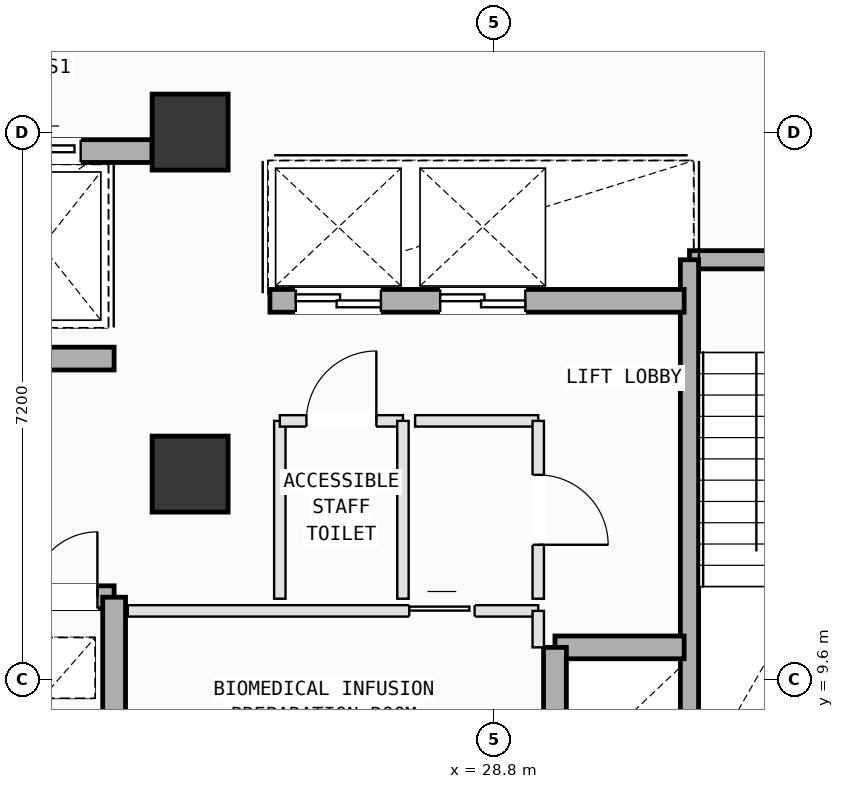
"""IFC4 building model, lengths in metres.
Left out: names, types, materials, properties, quantities, classifications, styles, units other than length and angle.
Written with IfcOpenShell. Run it as: python <this file> out.ifc"""

import sys

from ifc_helpers import new_model, si_unit, direction, frame, frame_2d, origin, origin_2d, place, context, subcontext, project, spatial, rectangle, extrude, element, fill, save


model = new_model("IFC4")
c1 = context("Model", 3, precision=1e-05, world=origin(), true_north=direction((0.0, 1.0)))
c2 = subcontext(c1, "Body", "Model", "MODEL_VIEW")
j1 = project(units=[si_unit("LENGTHUNIT", "METRE"), si_unit("PLANEANGLEUNIT", "RADIAN")], contexts=[c1])
p1 = place(None, origin())
s1 = spatial("IfcSite", under=j1, at=p1, CompositionType="ELEMENT")
p2 = place(p1, origin())
s2 = spatial("IfcBuilding", under=s1, at=p2, CompositionType="ELEMENT")
p3 = place(p2, frame((0.0, 0.0, 223.2)))
s3 = spatial("IfcBuildingStorey", under=s2, at=p3, CompositionType="ELEMENT", Elevation=223.2)
for number, where, z_axis, x_axis in (
    (1, (24.8, 12.3, 0.0), (0.0, 0.0, 1.0), (1.0, 0.0, 0.0)),
    (2, (24.8, 16.8, 0.0), (0.0, 0.0, 1.0), (1.0, 0.0, 0.0)),
):
    element("IfcColumn", number, at=place(p3, frame(where, z_axis=z_axis, x_axis=x_axis)), inside=s3, PredefinedType="COLUMN", context=c2, shape_type="SweptSolid", body=[
        extrude(rectangle(XDim=1.0, YDim=1.0, at=origin_2d()), origin(), (0.0, 0.0, 1.0), 4.0),
    ])
p4 = place(p3, frame((31.37, 15.12, 0.0), z_axis=(0.0, 0.0, 1.0), x_axis=(1.0, 0.0, 0.0)))
e3 = element("IfcWall", 3, at=p4, inside=s3, PredefinedType="SOLIDWALL", context=c2, shape_type="SweptSolid", body=[
    extrude(rectangle(XDim=3.46, YDim=0.24, at=frame_2d((1.73, 0.0))), origin(), (0.0, 0.0, 1.0), 3.78),
])
p5 = place(p4, frame((2.14, 0.0, 0.0)))
e4 = element("IfcOpeningElement", 4, at=p5, cuts=e3, PredefinedType="OPENING", context=c2, shape_type="SweptSolid", body=[
    extrude(rectangle(XDim=1.1, YDim=2.15, at=frame_2d((0.55, 1.075))), frame((0.0, 0.13, 0.0), z_axis=(0.0, -1.0, 0.0), x_axis=(1.0, 0.0, 0.0)), (0.0, 0.0, 1.0), 0.26),
])
p6 = place(p3, frame((31.37, 8.075, 0.0), z_axis=(0.0, 0.0, 1.0), x_axis=(0.0, 1.0, 0.0)))
e5 = element("IfcWall", 5, at=p6, inside=s3, PredefinedType="SOLIDWALL", context=c2, shape_type="SweptSolid", body=[
    extrude(rectangle(XDim=7.045, YDim=0.24, at=frame_2d((3.522, 0.0))), origin(), (0.0, 0.0, 1.0), 3.78),
])
p7 = place(p3, frame((19.85, 16.55, 0.0), z_axis=(0.0, 0.0, 1.0), x_axis=(1.0, 0.0, 0.0)))
e6 = element("IfcWall", 6, at=p7, inside=s3, PredefinedType="SOLIDWALL", context=c2, shape_type="SweptSolid", body=[
    extrude(rectangle(XDim=4.45, YDim=0.3, at=frame_2d((2.225, 0.0))), origin(), (0.0, 0.0, 1.0), 3.78),
])
p8 = place(p7, frame((0.475, 0.0, 0.0)))
e7 = element("IfcOpeningElement", 7, at=p8, cuts=e6, PredefinedType="OPENING", context=c2, shape_type="SweptSolid", body=[
    extrude(rectangle(XDim=1.25, YDim=2.18, at=frame_2d((0.625, 1.09))), frame((0.0, 0.16, 0.0), z_axis=(0.0, -1.0, 0.0), x_axis=(1.0, 0.0, 0.0)), (0.0, 0.0, 1.0), 0.32),
])
p9 = place(p7, frame((2.49, 0.0, 0.0)))
e8 = element("IfcOpeningElement", 8, at=p9, cuts=e6, PredefinedType="OPENING", context=c2, shape_type="SweptSolid", body=[
    extrude(rectangle(XDim=1.02, YDim=2.12, at=frame_2d((0.51, 1.06))), frame((0.0, 0.16, 0.0), z_axis=(0.0, -1.0, 0.0), x_axis=(1.0, 0.0, 0.0)), (0.0, 0.0, 1.0), 0.32),
])
p10 = place(p3, frame((18.5, 10.68, 0.0), z_axis=(0.0, 0.0, 1.0), x_axis=(1.0, 0.0, 0.0)))
e9 = element("IfcWall", 9, at=p10, inside=s3, PredefinedType="SOLIDWALL", context=c2, shape_type="SweptSolid", body=[
    extrude(rectangle(XDim=5.3, YDim=0.3, at=frame_2d((2.65, 0.0))), origin(), (0.0, 0.0, 1.0), 3.78),
])
p11 = place(p10, frame((4.22, 0.0, 0.0)))
e10 = element("IfcOpeningElement", 10, at=p11, cuts=e9, PredefinedType="OPENING", context=c2, shape_type="SweptSolid", body=[
    extrude(rectangle(XDim=0.86, YDim=2.06, at=frame_2d((0.43, 1.03))), frame((0.0, 0.16, 0.0), z_axis=(0.0, -1.0, 0.0), x_axis=(1.0, 0.0, 0.0)), (0.0, 0.0, 1.0), 0.32),
])
p12 = place(p10, frame((0.425, 0.0, 0.0)))
e11 = element("IfcOpeningElement", 11, at=p12, cuts=e9, PredefinedType="OPENING", context=c2, shape_type="SweptSolid", body=[
    extrude(rectangle(XDim=1.25, YDim=2.18, at=frame_2d((0.625, 1.09))), frame((0.0, 0.16, 0.0), z_axis=(0.0, -1.0, 0.0), x_axis=(1.0, 0.0, 0.0)), (0.0, 0.0, 1.0), 0.32),
])
p13 = place(p10, frame((2.525, 0.0, 0.0)))
e12 = element("IfcOpeningElement", 12, at=p13, cuts=e9, PredefinedType="OPENING", context=c2, shape_type="SweptSolid", body=[
    extrude(rectangle(XDim=1.25, YDim=2.18, at=frame_2d((0.625, 1.09))), frame((0.0, 0.16, 0.0), z_axis=(0.0, -1.0, 0.0), x_axis=(1.0, 0.0, 0.0)), (0.0, 0.0, 1.0), 0.32),
])
p14 = place(p3, frame((18.5, 13.82, 0.0), z_axis=(0.0, 0.0, 1.0), x_axis=(1.0, 0.0, 0.0)))
e13 = element("IfcWall", 13, at=p14, inside=s3, PredefinedType="SOLIDWALL", context=c2, shape_type="SweptSolid", body=[
    extrude(rectangle(XDim=5.3, YDim=0.3, at=frame_2d((2.65, 0.0))), origin(), (0.0, 0.0, 1.0), 3.78),
])
p15 = place(p14, frame((0.18, 0.0, 0.0)))
e14 = element("IfcOpeningElement", 14, at=p15, cuts=e13, PredefinedType="OPENING", context=c2, shape_type="SweptSolid", body=[
    extrude(rectangle(XDim=1.1, YDim=2.15, at=frame_2d((0.55, 1.075))), frame((0.0, 0.16, 0.0), z_axis=(0.0, -1.0, 0.0), x_axis=(1.0, 0.0, 0.0)), (0.0, 0.0, 1.0), 0.32),
])
p16 = place(p3, frame((23.8, 8.075, 0.0), z_axis=(0.0, 0.0, 1.0), x_axis=(0.0, 1.0, 0.0)))
e15 = element("IfcWall", 15, at=p16, inside=s3, PredefinedType="SOLIDWALL", context=c2, shape_type="SweptSolid", body=[
    extrude(rectangle(XDim=2.605, YDim=0.3, at=frame_2d((1.302, 0.0))), origin(), (0.0, 0.0, 1.0), 3.78),
])
p17 = place(p3, frame((29.6, 10.02, 0.0), z_axis=(0.0, 0.0, 1.0), x_axis=(1.0, 0.0, 0.0)))
e16 = element("IfcWall", 16, at=p17, inside=s3, PredefinedType="SOLIDWALL", context=c2, shape_type="SweptSolid", body=[
    extrude(rectangle(XDim=1.7, YDim=0.3, at=frame_2d((0.85, 0.0))), origin(), (0.0, 0.0, 1.0), 3.78),
])
p18 = place(p3, frame((29.6, 8.075, 0.0), z_axis=(0.0, 0.0, 1.0), x_axis=(0.0, 1.0, 0.0)))
e17 = element("IfcWall", 17, at=p18, inside=s3, PredefinedType="SOLIDWALL", context=c2, shape_type="SweptSolid", body=[
    extrude(rectangle(XDim=1.945, YDim=0.3, at=frame_2d((0.973, 0.0))), origin(), (0.0, 0.0, 1.0), 3.78),
])
p19 = place(p3, frame((25.85, 14.58, 0.0), z_axis=(0.0, 0.0, 1.0), x_axis=(1.0, 0.0, 0.0)))
e18 = element("IfcWall", 18, at=p19, inside=s3, PredefinedType="SOLIDWALL", context=c2, shape_type="SweptSolid", body=[
    extrude(rectangle(XDim=5.45, YDim=0.3, at=frame_2d((2.725, 0.0))), origin(), (0.0, 0.0, 1.0), 3.78),
])
p20 = place(p19, frame((0.34, 0.0, 0.0)))
e19 = element("IfcOpeningElement", 19, at=p20, cuts=e18, PredefinedType="OPENING", context=c2, shape_type="SweptSolid", body=[
    extrude(rectangle(XDim=1.12, YDim=2.15, at=frame_2d((0.56, 1.075))), frame((0.0, 0.16, 0.0), z_axis=(0.0, -1.0, 0.0), x_axis=(1.0, 0.0, 0.0)), (0.0, 0.0, 1.0), 0.32),
])
p21 = place(p19, frame((2.24, 0.0, 0.0)))
e20 = element("IfcOpeningElement", 20, at=p21, cuts=e18, PredefinedType="OPENING", context=c2, shape_type="SweptSolid", body=[
    extrude(rectangle(XDim=1.12, YDim=2.15, at=frame_2d((0.56, 1.075))), frame((0.0, 0.16, 0.0), z_axis=(0.0, -1.0, 0.0), x_axis=(1.0, 0.0, 0.0)), (0.0, 0.0, 1.0), 0.32),
])
p22 = place(p3, frame((23.98, 10.5, 0.0), z_axis=(0.0, 0.0, 1.0), x_axis=(1.0, 0.0, 0.0)))
e21 = element("IfcWall", 21, at=p22, inside=s3, PredefinedType="PARTITIONING", context=c2, shape_type="SweptSolid", body=[
    extrude(rectangle(XDim=5.4, YDim=0.15, at=frame_2d((2.7, 0.0))), origin(), (0.0, 0.0, 1.0), 3.78),
])
p23 = place(p22, frame((3.703, 0.0, 0.0)))
e22 = element("IfcOpeningElement", 22, at=p23, cuts=e21, PredefinedType="OPENING", context=c2, shape_type="SweptSolid", body=[
    extrude(rectangle(XDim=0.86, YDim=2.06, at=frame_2d((0.43, 1.03))), frame((0.0, 0.085, 0.0), z_axis=(0.0, -1.0, 0.0), x_axis=(1.0, 0.0, 0.0)), (0.0, 0.0, 1.0), 0.17),
])
p24 = place(p3, frame((29.38, 10.5, 0.0), z_axis=(0.0, 0.0, 1.0), x_axis=(0.0, -1.0, 0.0)))
e23 = element("IfcWall", 23, at=p24, inside=s3, PredefinedType="PARTITIONING", context=c2, shape_type="SweptSolid", body=[
    extrude(rectangle(XDim=0.48, YDim=0.15, at=frame_2d((0.24, 0.0))), origin(), (0.0, 0.0, 1.0), 3.78),
])
p25 = place(p3, frame((25.98, 10.66, 0.0), z_axis=(0.0, 0.0, 1.0), x_axis=(0.0, 1.0, 0.0)))
e24 = element("IfcWall", 24, at=p25, inside=s3, PredefinedType="PARTITIONING", context=c2, shape_type="SweptSolid", body=[
    extrude(rectangle(XDim=2.34, YDim=0.15, at=frame_2d((1.17, 0.0))), origin(), (0.0, 0.0, 1.0), 3.78),
])
p26 = place(p3, frame((25.98, 13.0, 0.0), z_axis=(0.0, 0.0, 1.0), x_axis=(1.0, 0.0, 0.0)))
e25 = element("IfcWall", 25, at=p26, inside=s3, PredefinedType="PARTITIONING", context=c2, shape_type="SweptSolid", body=[
    extrude(rectangle(XDim=1.62, YDim=0.15, at=frame_2d((0.81, 0.0))), origin(), (0.0, 0.0, 1.0), 3.78),
])
p27 = place(p26, frame((0.35, 0.0, 0.0)))
e26 = element("IfcOpeningElement", 26, at=p27, cuts=e25, PredefinedType="OPENING", context=c2, shape_type="SweptSolid", body=[
    extrude(rectangle(XDim=0.92, YDim=2.1, at=frame_2d((0.46, 1.05))), frame((0.0, 0.085, 0.0), z_axis=(0.0, -1.0, 0.0), x_axis=(1.0, 0.0, 0.0)), (0.0, 0.0, 1.0), 0.17),
])
p28 = place(p3, frame((27.6, 13.0, 0.0), z_axis=(0.0, 0.0, 1.0), x_axis=(0.0, -1.0, 0.0)))
e27 = element("IfcWall", 27, at=p28, inside=s3, PredefinedType="PARTITIONING", context=c2, shape_type="SweptSolid", body=[
    extrude(rectangle(XDim=2.34, YDim=0.15, at=frame_2d((1.17, 0.0))), origin(), (0.0, 0.0, 1.0), 3.78),
])
p29 = place(p3, frame((27.76, 13.0, 0.0), z_axis=(0.0, 0.0, 1.0), x_axis=(1.0, 0.0, 0.0)))
e28 = element("IfcWall", 28, at=p29, inside=s3, PredefinedType="PARTITIONING", context=c2, shape_type="SweptSolid", body=[
    extrude(rectangle(XDim=1.62, YDim=0.15, at=frame_2d((0.81, 0.0))), origin(), (0.0, 0.0, 1.0), 3.78),
])
p30 = place(p3, frame((29.38, 13.0, 0.0), z_axis=(0.0, 0.0, 1.0), x_axis=(0.0, -1.0, 0.0)))
e29 = element("IfcWall", 29, at=p30, inside=s3, PredefinedType="PARTITIONING", context=c2, shape_type="SweptSolid", body=[
    extrude(rectangle(XDim=2.34, YDim=0.15, at=frame_2d((1.17, 0.0))), origin(), (0.0, 0.0, 1.0), 3.78),
])
p31 = place(p30, frame((0.71, 0.0, 0.0)))
e30 = element("IfcOpeningElement", 30, at=p31, cuts=e29, PredefinedType="OPENING", context=c2, shape_type="SweptSolid", body=[
    extrude(rectangle(XDim=0.92, YDim=2.1, at=frame_2d((0.46, 1.05))), frame((0.0, 0.085, 0.0), z_axis=(0.0, -1.0, 0.0), x_axis=(1.0, 0.0, 0.0)), (0.0, 0.0, 1.0), 0.17),
])
p32 = place(p11, origin())
e31 = element("IfcDoor", 31, at=p32, inside=s3, OperationType="SINGLE_SWING_RIGHT", PredefinedType="DOOR", context=c2, shape_type="SweptSolid", body=[
    extrude(rectangle(XDim=0.86, YDim=2.06, at=frame_2d((0.43, 1.03))), frame((0.0, 0.025, 0.0), z_axis=(0.0, -1.0, 0.0), x_axis=(1.0, 0.0, 0.0)), (0.0, 0.0, 1.0), 0.05),
])
fill(e10, e31)
p33 = place(p20, origin())
e32 = element("IfcDoor", 32, at=p33, inside=s3, OperationType="DOUBLE_DOOR_SLIDING", PredefinedType="DOOR", context=c2, shape_type="SweptSolid", body=[
    extrude(rectangle(XDim=1.12, YDim=2.15, at=frame_2d((0.56, 1.075))), frame((0.0, 0.025, 0.0), z_axis=(0.0, -1.0, 0.0), x_axis=(1.0, 0.0, 0.0)), (0.0, 0.0, 1.0), 0.05),
])
fill(e19, e32)
p34 = place(p21, origin())
e33 = element("IfcDoor", 33, at=p34, inside=s3, OperationType="DOUBLE_DOOR_SLIDING", PredefinedType="DOOR", context=c2, shape_type="SweptSolid", body=[
    extrude(rectangle(XDim=1.12, YDim=2.15, at=frame_2d((0.56, 1.075))), frame((0.0, 0.025, 0.0), z_axis=(0.0, -1.0, 0.0), x_axis=(1.0, 0.0, 0.0)), (0.0, 0.0, 1.0), 0.05),
])
fill(e20, e33)
p35 = place(p9, origin())
e34 = element("IfcDoor", 34, at=p35, inside=s3, OperationType="SLIDING_TO_LEFT", PredefinedType="DOOR", context=c2, shape_type="SweptSolid", body=[
    extrude(rectangle(XDim=1.02, YDim=2.12, at=frame_2d((0.51, 1.06))), frame((0.0, 0.025, 0.0), z_axis=(0.0, -1.0, 0.0), x_axis=(1.0, 0.0, 0.0)), (0.0, 0.0, 1.0), 0.05),
])
fill(e8, e34)
p36 = place(p27, origin())
e35 = element("IfcDoor", 35, at=p36, inside=s3, OperationType="SINGLE_SWING_RIGHT", PredefinedType="DOOR", context=c2, shape_type="SweptSolid", body=[
    extrude(rectangle(XDim=0.92, YDim=2.1, at=frame_2d((0.46, 1.05))), frame((0.0, 0.025, 0.0), z_axis=(0.0, -1.0, 0.0), x_axis=(1.0, 0.0, 0.0)), (0.0, 0.0, 1.0), 0.05),
])
fill(e26, e35)
p37 = place(p31, origin())
e36 = element("IfcDoor", 36, at=p37, inside=s3, OperationType="SINGLE_SWING_RIGHT", PredefinedType="DOOR", context=c2, shape_type="SweptSolid", body=[
    extrude(rectangle(XDim=0.92, YDim=2.1, at=frame_2d((0.46, 1.05))), frame((0.0, 0.025, 0.0), z_axis=(0.0, -1.0, 0.0), x_axis=(1.0, 0.0, 0.0)), (0.0, 0.0, 1.0), 0.05),
])
fill(e30, e36)
p38 = place(p23, origin())
e37 = element("IfcDoor", 37, at=p38, inside=s3, OperationType="SLIDING_TO_LEFT", PredefinedType="DOOR", context=c2, shape_type="SweptSolid", body=[
    extrude(rectangle(XDim=0.86, YDim=2.06, at=frame_2d((0.43, 1.03))), frame((0.0, 0.025, 0.0), z_axis=(0.0, -1.0, 0.0), x_axis=(1.0, 0.0, 0.0)), (0.0, 0.0, 1.0), 0.05),
])
fill(e22, e37)
save(model, sys.argv[1])
